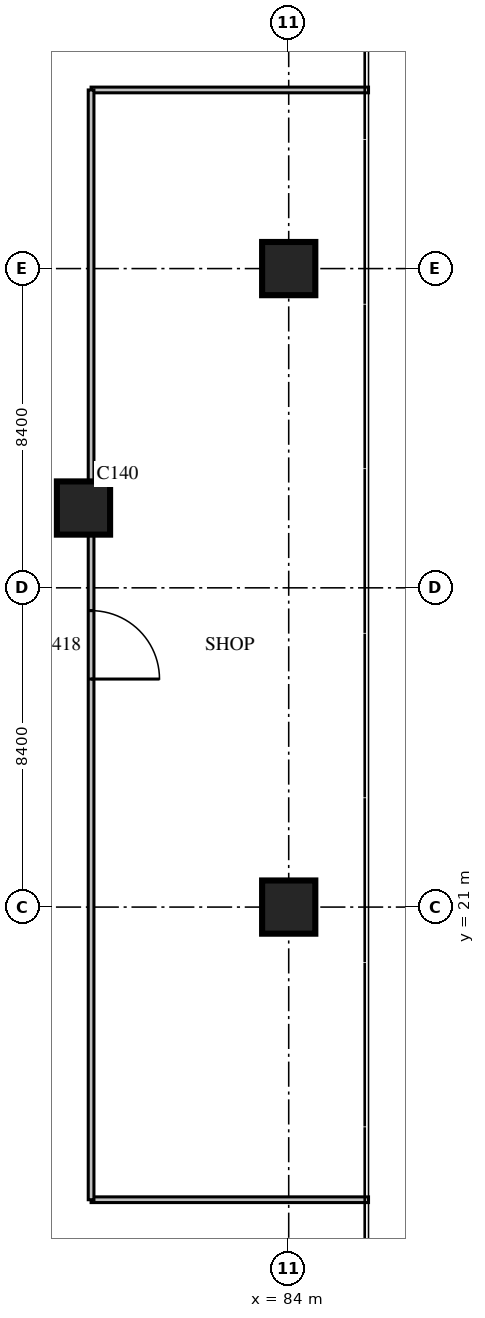
"""IFC4 building model, lengths in metres.
Left out: names, types, materials, properties, quantities, classifications, styles, units other than length and angle.
Written with IfcOpenShell. Run it as: python <this file> out.ifc"""

import sys

from ifc_helpers import new_model, si_unit, direction, frame, frame_2d, origin, origin_2d, place, context, subcontext, project, spatial, rectangle, extrude, source, transform, mapped, element, fill, save


model = new_model("IFC4")
c1 = context("Model", 3, precision=1e-05, world=origin(), true_north=direction((0.0, 1.0)))
c2 = subcontext(c1, "Body", "Model", "MODEL_VIEW")
j1 = project(units=[si_unit("LENGTHUNIT", "METRE"), si_unit("PLANEANGLEUNIT", "RADIAN")], contexts=[c1])
p1 = place(None, origin())
s1 = spatial("IfcSite", under=j1, at=p1, CompositionType="ELEMENT")
p2 = place(p1, origin())
s2 = spatial("IfcBuilding", under=s1, at=p2, CompositionType="ELEMENT")
p3 = place(p2, frame((0.0, 0.0, 7.5)))
s3 = spatial("IfcBuildingStorey", under=s2, at=p3, CompositionType="ELEMENT", Elevation=7.5)
m1 = source(origin(), c2, "Body", "SweptSolid", [
    extrude(rectangle(XDim=1.4, YDim=1.4, at=origin_2d()), origin(), (0.0, 0.0, 1.0), 5.4),
])
for number, where, z_axis, x_axis in (
    (1, (78.6, 31.5, 0.0), (0.0, 0.0, 1.0), (1.0, 0.0, 0.0)),
    (2, (84.0, 21.0, 0.0), (0.0, 0.0, 1.0), (1.0, 0.0, 0.0)),
    (3, (84.0, 37.8, 0.0), (0.0, 0.0, 1.0), (1.0, 0.0, 0.0)),
):
    element("IfcColumn", number, at=place(p3, frame(where, z_axis=z_axis, x_axis=x_axis)), inside=s3, PredefinedType="COLUMN", context=c2, shape_type="MappedRepresentation", body=[
        mapped(m1, transform((0.0, 0.0, 0.0), scale=1.0)),
    ])
m2 = source(origin(), c2, "Body", "SweptSolid", [
    extrude(rectangle(XDim=7.3, YDim=0.15, at=frame_2d((3.65, 0.0))), origin(), (0.0, 0.0, 1.0), 4.8),
])
for number, where, z_axis, x_axis in (
    (4, (78.8, 13.3, 0.0), (0.0, 0.0, 1.0), (1.0, 0.0, 0.0)),
    (5, (78.8, 42.5, 0.0), (0.0, 0.0, 1.0), (1.0, 0.0, 0.0)),
):
    element("IfcWall", number, at=place(p3, frame(where, z_axis=z_axis, x_axis=x_axis)), inside=s3, PredefinedType="PARTITIONING", context=c2, shape_type="MappedRepresentation", body=[
        mapped(m2, transform((0.0, 0.0, 0.0), scale=1.0)),
    ])
m3 = source(origin(), c2, "Body", "SweptSolid", [
    extrude(rectangle(XDim=29.2, YDim=0.15, at=frame_2d((14.6, 0.0))), origin(), (0.0, 0.0, 1.0), 4.8),
])
p4 = place(p3, frame((78.8, 13.3, 0.0), z_axis=(0.0, 0.0, 1.0), x_axis=(0.0, 1.0, 0.0)))
e6 = element("IfcWall", 6, at=p4, inside=s3, PredefinedType="PARTITIONING", context=c2, shape_type="MappedRepresentation", body=[
    mapped(m3, transform((0.0, 0.0, 0.0), scale=1.0)),
])
m4 = source(origin(), c2, "Body", "SweptSolid", [
    extrude(rectangle(XDim=1.8, YDim=2.1, at=frame_2d((0.9, 1.05))), frame((0.0, 0.085, 0.0), z_axis=(0.0, -1.0, 0.0), x_axis=(1.0, 0.0, 0.0)), (0.0, 0.0, 1.0), 0.17),
])
p5 = place(p4, frame((13.7, 0.0, 0.0)))
e7 = element("IfcOpeningElement", 7, at=p5, cuts=e6, PredefinedType="OPENING", context=c2, shape_type="MappedRepresentation", body=[
    mapped(m4, transform((0.0, 0.0, 0.0), scale=1.0)),
])
m5 = source(origin(), c2, "Body", "SweptSolid", [
    extrude(rectangle(XDim=1.8, YDim=2.1, at=frame_2d((0.9, 1.05))), frame((0.0, 0.025, 0.0), z_axis=(0.0, -1.0, 0.0), x_axis=(1.0, 0.0, 0.0)), (0.0, 0.0, 1.0), 0.05),
])
p6 = place(p5, origin())
e8 = element("IfcDoor", 8, at=p6, inside=s3, OperationType="DOUBLE_DOOR_SINGLE_SWING", PredefinedType="DOOR", context=c2, shape_type="MappedRepresentation", body=[
    mapped(m5, transform((0.0, 0.0, 0.0), scale=1.0)),
])
fill(e7, e8)
save(model, sys.argv[1])
